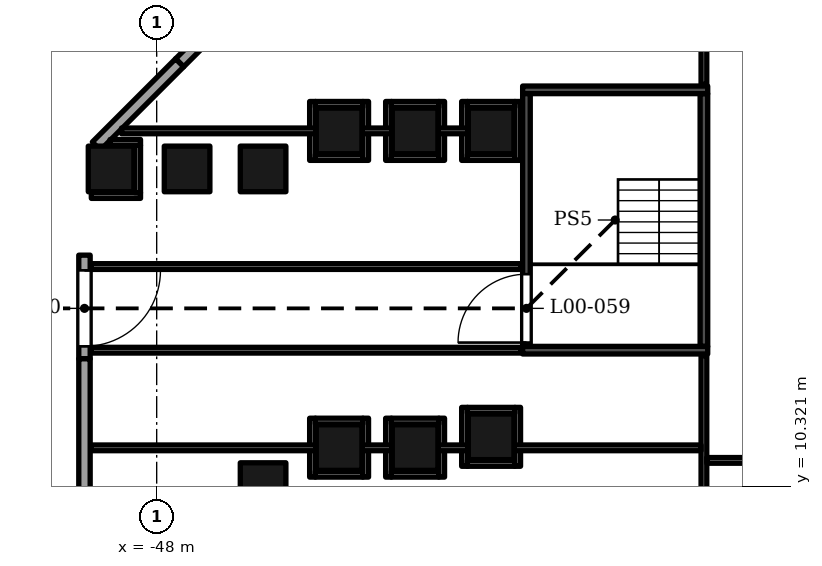
"""IFC4 building model, lengths in metres.
Left out: names, types, materials, properties, quantities, classifications, styles, units other than length and angle.
Written with IfcOpenShell. Run it as: python <this file> out.ifc"""

import sys

from ifc_helpers import new_model, si_unit, direction, frame, frame_2d, origin, origin_2d, place, context, subcontext, project, spatial, rectangle, extrude, element, fill, save


model = new_model("IFC4")
c1 = context("Model", 3, precision=1e-05, world=origin(), true_north=direction((0.0, 1.0)))
c2 = subcontext(c1, "Body", "Model", "MODEL_VIEW")
j1 = project(units=[si_unit("LENGTHUNIT", "METRE"), si_unit("PLANEANGLEUNIT", "RADIAN")], contexts=[c1])
p1 = place(None, origin())
s1 = spatial("IfcSite", under=j1, at=p1, CompositionType="ELEMENT")
p2 = place(p1, origin())
s2 = spatial("IfcBuilding", under=s1, at=p2, CompositionType="ELEMENT")
p3 = place(p2, origin())
s3 = spatial("IfcBuildingStorey", under=s2, at=p3, CompositionType="ELEMENT", Elevation=0.0)
for number, where, z_axis, x_axis in (
    (1, (-39.2, 19.669, 0.0), (0.0, 0.0, 1.0), (1.0, 0.0, 0.0)),
    (2, (-39.2, 11.62, 0.0), (0.0, 0.0, 1.0), (1.0, 0.0, 0.0)),
    (3, (-41.2, 19.669, 0.0), (0.0, 0.0, 1.0), (1.0, 0.0, 0.0)),
    (4, (-41.2, 11.337, 0.0), (0.0, 0.0, 1.0), (1.0, 0.0, 0.0)),
    (5, (-43.2, 19.669, 0.0), (0.0, 0.0, 1.0), (1.0, 0.0, 0.0)),
    (6, (-43.2, 11.337, 0.0), (0.0, 0.0, 1.0), (1.0, 0.0, 0.0)),
    (7, (-45.2, 18.669, 0.0), (0.0, 0.0, 1.0), (1.0, 0.0, 0.0)),
    (8, (-45.2, 10.337, 0.0), (0.0, 0.0, 1.0), (1.0, 0.0, 0.0)),
    (9, (-47.2, 18.669, 0.0), (0.0, 0.0, 1.0), (1.0, 0.0, 0.0)),
    (10, (-49.2, 18.669, 0.0), (0.0, 0.0, 1.0), (1.0, 0.0, 0.0)),
):
    element("IfcColumn", number, at=place(p3, frame(where, z_axis=z_axis, x_axis=x_axis)), inside=s3, PredefinedType="COLUMN", context=c2, shape_type="SweptSolid", body=[
        extrude(rectangle(XDim=1.2, YDim=1.2, at=origin_2d()), origin(), (0.0, 0.0, 1.0), 9.0),
    ])
p4 = place(p3, frame((-44.271, 24.588, 0.0), z_axis=(0.0, 0.0, 1.0), x_axis=(-0.707079166839, -0.707134394455, 0.0)))
e11 = element("IfcWall", 11, at=p4, inside=s3, PredefinedType="ELEMENTEDWALL", context=c2, shape_type="SweptSolid", body=[
    extrude(rectangle(XDim=4.421, YDim=0.3, at=frame_2d((2.21, 0.0))), origin(), (0.0, 0.0, 1.0), 7.6),
])
p5 = place(p4, frame((1.021, 0.0, 0.0)))
e12 = element("IfcOpeningElement", 12, at=p5, cuts=e11, PredefinedType="OPENING", context=c2, shape_type="SweptSolid", body=[
    extrude(rectangle(XDim=3.0, YDim=2.7, at=frame_2d((1.5, 1.35))), frame((0.0, 0.16, 0.0), z_axis=(0.0, -1.0, 0.0), x_axis=(1.0, 0.0, 0.0)), (0.0, 0.0, 1.0), 0.32),
])
p6 = place(p3, frame((-47.397, 21.462, 0.0), z_axis=(0.0, 0.0, 1.0), x_axis=(-0.707146179809, -0.707067380369, 0.0)))
e13 = element("IfcWall", 13, at=p6, inside=s3, PredefinedType="SOLIDWALL", context=c2, shape_type="SweptSolid", body=[
    extrude(rectangle(XDim=3.098, YDim=0.3, at=frame_2d((1.549, 0.0))), origin(), (0.0, 0.0, 1.0), 7.6),
])
p7 = place(p3, frame((-49.9, 16.4, 0.0), z_axis=(0.0, 0.0, 1.0), x_axis=(0.0, -1.0, 0.0)))
e14 = element("IfcWall", 14, at=p7, inside=s3, PredefinedType="ELEMENTEDWALL", context=c2, shape_type="SweptSolid", body=[
    extrude(rectangle(XDim=2.727, YDim=0.3, at=frame_2d((1.363, 0.0))), origin(), (0.0, 0.0, 1.0), 7.6),
])
p8 = place(p7, frame((0.4, 0.0, 0.0)))
e15 = element("IfcOpeningElement", 15, at=p8, cuts=e14, PredefinedType="OPENING", context=c2, shape_type="SweptSolid", body=[
    extrude(rectangle(XDim=2.0, YDim=2.4, at=frame_2d((1.0, 1.2))), frame((0.0, 0.16, 0.0), z_axis=(0.0, -1.0, 0.0), x_axis=(1.0, 0.0, 0.0)), (0.0, 0.0, 1.0), 0.32),
])
p9 = place(p3, frame((-49.9, 13.673, 0.0), z_axis=(0.0, 0.0, 1.0), x_axis=(0.0, -1.0, 0.0)))
e16 = element("IfcWall", 16, at=p9, inside=s3, PredefinedType="ELEMENTEDWALL", context=c2, shape_type="SweptSolid", body=[
    extrude(rectangle(XDim=4.102, YDim=0.3, at=frame_2d((2.051, 0.0))), origin(), (0.0, 0.0, 1.0), 7.6),
])
p10 = place(p9, frame((0.327, 0.0, 0.0)))
e17 = element("IfcOpeningElement", 17, at=p10, cuts=e16, PredefinedType="OPENING", context=c2, shape_type="SweptSolid", body=[
    extrude(rectangle(XDim=1.2, YDim=2.7, at=frame_2d((0.6, 1.35))), frame((0.0, 0.16, 0.0), z_axis=(0.0, -1.0, 0.0), x_axis=(1.0, 0.0, 0.0)), (0.0, 0.0, 1.0), 0.32),
])
p11 = place(p3, frame((-44.042, 24.745, 9.0), z_axis=(0.0, 0.0, 1.0), x_axis=(-0.7071215324, -0.707092029666, 0.0)))
e18 = element("IfcWall", 18, at=p11, inside=s3, PredefinedType="PARAPET", context=c2, shape_type="SweptSolid", body=[
    extrude(rectangle(XDim=8.275, YDim=0.3, at=frame_2d((4.138, 0.0))), origin(), (0.0, 0.0, 1.0), 1.1),
])
p12 = place(p3, frame((-49.85, 18.79, 9.0), z_axis=(0.0, 0.0, 1.0), x_axis=(0.0, -1.0, 0.0)))
e19 = element("IfcWall", 19, at=p12, inside=s3, PredefinedType="PARAPET", context=c2, shape_type="SweptSolid", body=[
    extrude(rectangle(XDim=14.698, YDim=0.3, at=frame_2d((7.349, 0.0))), origin(), (0.0, 0.0, 1.0), 1.1),
])
for number, where, z_axis, x_axis in (
    (20, (-38.37, 13.9, 0.0), (0.0, 0.0, 1.0), (1.0, 0.0, 0.0)),
    (21, (-38.37, 20.75, 0.0), (0.0, 0.0, 1.0), (1.0, 0.0, 0.0)),
):
    element("IfcWall", number, at=place(p3, frame(where, z_axis=z_axis, x_axis=x_axis)), inside=s3, PredefinedType="SOLIDWALL", context=c2, shape_type="SweptSolid", body=[
        extrude(rectangle(XDim=4.87, YDim=0.2, at=frame_2d((2.435, 0.0))), origin(), (0.0, 0.0, 1.0), 8.5),
    ])
p13 = place(p3, frame((-38.27, 14.0, 0.0), z_axis=(0.0, 0.0, 1.0), x_axis=(0.0, 1.0, 0.0)))
e22 = element("IfcWall", 22, at=p13, inside=s3, PredefinedType="SOLIDWALL", context=c2, shape_type="SweptSolid", body=[
    extrude(rectangle(XDim=6.65, YDim=0.2, at=frame_2d((3.325, 0.0))), origin(), (0.0, 0.0, 1.0), 8.5),
])
p14 = place(p13, frame((0.1, 0.0, 0.0)))
e23 = element("IfcOpeningElement", 23, at=p14, cuts=e22, PredefinedType="OPENING", context=c2, shape_type="SweptSolid", body=[
    extrude(rectangle(XDim=1.8, YDim=2.4, at=frame_2d((0.9, 1.2))), frame((0.0, 0.11, 0.0), z_axis=(0.0, -1.0, 0.0), x_axis=(1.0, 0.0, 0.0)), (0.0, 0.0, 1.0), 0.22),
])
p15 = place(p3, frame((-33.6, 14.0, 0.0), z_axis=(0.0, 0.0, 1.0), x_axis=(0.0, 1.0, 0.0)))
e24 = element("IfcWall", 24, at=p15, inside=s3, PredefinedType="SOLIDWALL", context=c2, shape_type="SweptSolid", body=[
    extrude(rectangle(XDim=6.65, YDim=0.2, at=frame_2d((3.325, 0.0))), origin(), (0.0, 0.0, 1.0), 8.5),
])
p16 = place(p15, frame((0.1, 0.0, 0.0)))
e25 = element("IfcOpeningElement", 25, at=p16, cuts=e24, PredefinedType="OPENING", context=c2, shape_type="SweptSolid", body=[
    extrude(rectangle(XDim=1.8, YDim=2.4, at=frame_2d((0.9, 1.2))), frame((0.0, 0.11, 0.0), z_axis=(0.0, -1.0, 0.0), x_axis=(1.0, 0.0, 0.0)), (0.0, 0.0, 1.0), 0.22),
])
p17 = place(p3, frame((-33.6, 4.69, 0.0), z_axis=(0.0, 0.0, 1.0), x_axis=(0.0, 1.0, 0.0)))
e26 = element("IfcWall", 26, at=p17, inside=s3, PredefinedType="PARTITIONING", context=c2, shape_type="SweptSolid", body=[
    extrude(rectangle(XDim=9.07, YDim=0.15, at=frame_2d((4.535, 0.0))), origin(), (0.0, 0.0, 1.0), 7.3),
])
p18 = place(p3, frame((-43.9, 10.56, 0.0), z_axis=(0.0, 0.0, 1.0), x_axis=(0.0, 1.0, 0.0)))
e27 = element("IfcWall", 27, at=p18, inside=s3, PredefinedType="PARTITIONING", context=c2, shape_type="SweptSolid", body=[
    extrude(rectangle(XDim=1.55, YDim=0.15, at=frame_2d((0.775, 0.0))), origin(), (0.0, 0.0, 1.0), 8.5),
])
p19 = place(p3, frame((-43.825, 10.635, 0.0), z_axis=(0.0, 0.0, 1.0), x_axis=(1.0, 0.0, 0.0)))
e28 = element("IfcWall", 28, at=p19, inside=s3, PredefinedType="PARTITIONING", context=c2, shape_type="SweptSolid", body=[
    extrude(rectangle(XDim=1.25, YDim=0.15, at=frame_2d((0.625, 0.0))), origin(), (0.0, 0.0, 1.0), 8.5),
])
for number, where, z_axis, x_axis in (
    (29, (-42.5, 10.56, 0.0), (0.0, 0.0, 1.0), (0.0, 1.0, 0.0)),
    (30, (-41.9, 10.56, 0.0), (0.0, 0.0, 1.0), (0.0, 1.0, 0.0)),
):
    element("IfcWall", number, at=place(p3, frame(where, z_axis=z_axis, x_axis=x_axis)), inside=s3, PredefinedType="PARTITIONING", context=c2, shape_type="SweptSolid", body=[
        extrude(rectangle(XDim=1.55, YDim=0.15, at=frame_2d((0.775, 0.0))), origin(), (0.0, 0.0, 1.0), 8.5),
    ])
p20 = place(p3, frame((-41.825, 10.635, 0.0), z_axis=(0.0, 0.0, 1.0), x_axis=(1.0, 0.0, 0.0)))
e31 = element("IfcWall", 31, at=p20, inside=s3, PredefinedType="PARTITIONING", context=c2, shape_type="SweptSolid", body=[
    extrude(rectangle(XDim=1.25, YDim=0.15, at=frame_2d((0.625, 0.0))), origin(), (0.0, 0.0, 1.0), 8.5),
])
for number, where, z_axis, x_axis in (
    (32, (-40.5, 10.56, 0.0), (0.0, 0.0, 1.0), (0.0, 1.0, 0.0)),
    (33, (-39.9, 10.845, 0.0), (0.0, 0.0, 1.0), (0.0, 1.0, 0.0)),
):
    element("IfcWall", number, at=place(p3, frame(where, z_axis=z_axis, x_axis=x_axis)), inside=s3, PredefinedType="PARTITIONING", context=c2, shape_type="SweptSolid", body=[
        extrude(rectangle(XDim=1.55, YDim=0.15, at=frame_2d((0.775, 0.0))), origin(), (0.0, 0.0, 1.0), 8.5),
    ])
p21 = place(p3, frame((-39.825, 10.92, 0.0), z_axis=(0.0, 0.0, 1.0), x_axis=(1.0, 0.0, 0.0)))
e34 = element("IfcWall", 34, at=p21, inside=s3, PredefinedType="PARTITIONING", context=c2, shape_type="SweptSolid", body=[
    extrude(rectangle(XDim=1.25, YDim=0.15, at=frame_2d((0.625, 0.0))), origin(), (0.0, 0.0, 1.0), 8.5),
])
p22 = place(p3, frame((-38.5, 10.845, 0.0), z_axis=(0.0, 0.0, 1.0), x_axis=(0.0, 1.0, 0.0)))
e35 = element("IfcWall", 35, at=p22, inside=s3, PredefinedType="PARTITIONING", context=c2, shape_type="SweptSolid", body=[
    extrude(rectangle(XDim=1.55, YDim=0.15, at=frame_2d((0.775, 0.0))), origin(), (0.0, 0.0, 1.0), 8.5),
])
p23 = place(p3, frame((-33.525, 11.0, 0.0), z_axis=(0.0, 0.0, 1.0), x_axis=(1.0, 0.0, 0.0)))
e36 = element("IfcWall", 36, at=p23, inside=s3, PredefinedType="PARTITIONING", context=c2, shape_type="SweptSolid", body=[
    extrude(rectangle(XDim=3.85, YDim=0.15, at=frame_2d((1.925, 0.0))), origin(), (0.0, 0.0, 1.0), 7.3),
])
p24 = place(p23, frame((1.425, 0.0, 0.0)))
e37 = element("IfcOpeningElement", 37, at=p24, cuts=e36, PredefinedType="OPENING", context=c2, shape_type="SweptSolid", body=[
    extrude(rectangle(XDim=0.9, YDim=2.1, at=frame_2d((0.45, 1.05))), frame((0.0, 0.085, 0.0), z_axis=(0.0, -1.0, 0.0), x_axis=(1.0, 0.0, 0.0)), (0.0, 0.0, 1.0), 0.17),
])
p25 = place(p3, frame((-49.72, 11.33, 0.0), z_axis=(0.0, 0.0, 1.0), x_axis=(1.0, 0.0, 0.0)))
e38 = element("IfcWall", 38, at=p25, inside=s3, PredefinedType="PARTITIONING", context=c2, shape_type="SweptSolid", body=[
    extrude(rectangle(XDim=5.92, YDim=0.15, at=frame_2d((2.96, 0.0))), origin(), (0.0, 0.0, 1.0), 7.6),
])
for number, where, z_axis, x_axis in (
    (39, (-42.6, 11.33, 0.0), (0.0, 0.0, 1.0), (1.0, 0.0, 0.0)),
    (40, (-40.6, 11.33, 0.0), (0.0, 0.0, 1.0), (1.0, 0.0, 0.0)),
):
    element("IfcWall", number, at=place(p3, frame(where, z_axis=z_axis, x_axis=x_axis)), inside=s3, PredefinedType="PARTITIONING", context=c2, shape_type="SweptSolid", body=[
        extrude(rectangle(XDim=0.8, YDim=0.15, at=frame_2d((0.4, 0.0))), origin(), (0.0, 0.0, 1.0), 8.5),
    ])
p26 = place(p3, frame((-38.6, 11.33, 0.0), z_axis=(0.0, 0.0, 1.0), x_axis=(1.0, 0.0, 0.0)))
e41 = element("IfcWall", 41, at=p26, inside=s3, PredefinedType="PARTITIONING", context=c2, shape_type="SweptSolid", body=[
    extrude(rectangle(XDim=4.925, YDim=0.15, at=frame_2d((2.462, 0.0))), origin(), (0.0, 0.0, 1.0), 8.5),
])
for number, where, z_axis, x_axis in (
    (42, (-43.825, 12.035, 0.0), (0.0, 0.0, 1.0), (1.0, 0.0, 0.0)),
    (43, (-41.825, 12.035, 0.0), (0.0, 0.0, 1.0), (1.0, 0.0, 0.0)),
    (44, (-39.825, 12.32, 0.0), (0.0, 0.0, 1.0), (1.0, 0.0, 0.0)),
):
    element("IfcWall", number, at=place(p3, frame(where, z_axis=z_axis, x_axis=x_axis)), inside=s3, PredefinedType="PARTITIONING", context=c2, shape_type="SweptSolid", body=[
        extrude(rectangle(XDim=1.25, YDim=0.15, at=frame_2d((0.625, 0.0))), origin(), (0.0, 0.0, 1.0), 8.5),
    ])
p27 = place(p3, frame((-49.72, 13.899, 0.0), z_axis=(0.0, 0.0, 1.0), x_axis=(1.0, 0.0, 0.0)))
e45 = element("IfcWall", 45, at=p27, inside=s3, PredefinedType="PARTITIONING", context=c2, shape_type="SweptSolid", body=[
    extrude(rectangle(XDim=11.31, YDim=0.151, at=frame_2d((5.655, 0.0))), origin(), (0.0, 0.0, 1.0), 7.6),
])
p28 = place(p27, frame((5.155, 0.0, 0.0)))
e46 = element("IfcOpeningElement", 46, at=p28, cuts=e45, PredefinedType="OPENING", context=c2, shape_type="SweptSolid", body=[
    extrude(rectangle(XDim=1.2, YDim=2.1, at=frame_2d((0.6, 1.05))), frame((0.0, 0.085, 0.0), z_axis=(0.0, -1.0, 0.0), x_axis=(1.0, 0.0, 0.0)), (0.0, 0.0, 1.0), 0.171),
])
p29 = place(p3, frame((-49.72, 16.101, 0.0), z_axis=(0.0, 0.0, 1.0), x_axis=(1.0, 0.0, 0.0)))
e47 = element("IfcWall", 47, at=p29, inside=s3, PredefinedType="PARTITIONING", context=c2, shape_type="SweptSolid", body=[
    extrude(rectangle(XDim=11.31, YDim=0.151, at=frame_2d((5.655, 0.0))), origin(), (0.0, 0.0, 1.0), 7.6),
])
p30 = place(p29, frame((5.07, 0.0, 0.0)))
e48 = element("IfcOpeningElement", 48, at=p30, cuts=e47, PredefinedType="OPENING", context=c2, shape_type="SweptSolid", body=[
    extrude(rectangle(XDim=1.2, YDim=2.1, at=frame_2d((0.6, 1.05))), frame((0.0, 0.085, 0.0), z_axis=(0.0, -1.0, 0.0), x_axis=(1.0, 0.0, 0.0)), (0.0, 0.0, 1.0), 0.171),
])
p31 = place(p3, frame((-49.72, 17.969, 0.0), z_axis=(0.0, 0.0, 1.0), x_axis=(1.0, 0.0, 0.0)))
e49 = element("IfcWall", 49, at=p31, inside=s3, PredefinedType="PARTITIONING", context=c2, shape_type="SweptSolid", body=[
    extrude(rectangle(XDim=1.295, YDim=0.15, at=frame_2d((0.647, 0.0))), origin(), (0.0, 0.0, 1.0), 8.5),
])
p32 = place(p3, frame((-48.5, 18.044, 0.0), z_axis=(0.0, 0.0, 1.0), x_axis=(0.0, 1.0, 0.0)))
e50 = element("IfcWall", 50, at=p32, inside=s3, PredefinedType="PARTITIONING", context=c2, shape_type="SweptSolid", body=[
    extrude(rectangle(XDim=1.25, YDim=0.15, at=frame_2d((0.625, 0.0))), origin(), (0.0, 0.0, 1.0), 8.5),
])
p33 = place(p3, frame((-43.9, 18.894, 0.0), z_axis=(0.0, 0.0, 1.0), x_axis=(0.0, 1.0, 0.0)))
e51 = element("IfcWall", 51, at=p33, inside=s3, PredefinedType="PARTITIONING", context=c2, shape_type="SweptSolid", body=[
    extrude(rectangle(XDim=1.55, YDim=0.15, at=frame_2d((0.775, 0.0))), origin(), (0.0, 0.0, 1.0), 8.5),
])
p34 = place(p3, frame((-43.825, 18.969, 0.0), z_axis=(0.0, 0.0, 1.0), x_axis=(1.0, 0.0, 0.0)))
e52 = element("IfcWall", 52, at=p34, inside=s3, PredefinedType="PARTITIONING", context=c2, shape_type="SweptSolid", body=[
    extrude(rectangle(XDim=1.25, YDim=0.15, at=frame_2d((0.625, 0.0))), origin(), (0.0, 0.0, 1.0), 8.5),
])
for number, where, z_axis, x_axis in (
    (53, (-42.5, 18.894, 0.0), (0.0, 0.0, 1.0), (0.0, 1.0, 0.0)),
    (54, (-41.9, 18.894, 0.0), (0.0, 0.0, 1.0), (0.0, 1.0, 0.0)),
):
    element("IfcWall", number, at=place(p3, frame(where, z_axis=z_axis, x_axis=x_axis)), inside=s3, PredefinedType="PARTITIONING", context=c2, shape_type="SweptSolid", body=[
        extrude(rectangle(XDim=1.55, YDim=0.15, at=frame_2d((0.775, 0.0))), origin(), (0.0, 0.0, 1.0), 8.5),
    ])
p35 = place(p3, frame((-41.825, 18.969, 0.0), z_axis=(0.0, 0.0, 1.0), x_axis=(1.0, 0.0, 0.0)))
e55 = element("IfcWall", 55, at=p35, inside=s3, PredefinedType="PARTITIONING", context=c2, shape_type="SweptSolid", body=[
    extrude(rectangle(XDim=1.25, YDim=0.15, at=frame_2d((0.625, 0.0))), origin(), (0.0, 0.0, 1.0), 8.5),
])
for number, where, z_axis, x_axis in (
    (56, (-40.5, 18.894, 0.0), (0.0, 0.0, 1.0), (0.0, 1.0, 0.0)),
    (57, (-39.9, 18.894, 0.0), (0.0, 0.0, 1.0), (0.0, 1.0, 0.0)),
):
    element("IfcWall", number, at=place(p3, frame(where, z_axis=z_axis, x_axis=x_axis)), inside=s3, PredefinedType="PARTITIONING", context=c2, shape_type="SweptSolid", body=[
        extrude(rectangle(XDim=1.55, YDim=0.15, at=frame_2d((0.775, 0.0))), origin(), (0.0, 0.0, 1.0), 8.5),
    ])
p36 = place(p3, frame((-39.825, 18.969, 0.0), z_axis=(0.0, 0.0, 1.0), x_axis=(1.0, 0.0, 0.0)))
e58 = element("IfcWall", 58, at=p36, inside=s3, PredefinedType="PARTITIONING", context=c2, shape_type="SweptSolid", body=[
    extrude(rectangle(XDim=1.25, YDim=0.15, at=frame_2d((0.625, 0.0))), origin(), (0.0, 0.0, 1.0), 8.5),
])
p37 = place(p3, frame((-38.5, 18.894, 0.0), z_axis=(0.0, 0.0, 1.0), x_axis=(0.0, 1.0, 0.0)))
e59 = element("IfcWall", 59, at=p37, inside=s3, PredefinedType="PARTITIONING", context=c2, shape_type="SweptSolid", body=[
    extrude(rectangle(XDim=1.55, YDim=0.15, at=frame_2d((0.775, 0.0))), origin(), (0.0, 0.0, 1.0), 8.5),
])
p38 = place(p3, frame((-49.227, 19.369, 0.0), z_axis=(0.0, 0.0, 1.0), x_axis=(1.0, 0.0, 0.0)))
e60 = element("IfcWall", 60, at=p38, inside=s3, PredefinedType="PARTITIONING", context=c2, shape_type="SweptSolid", body=[
    extrude(rectangle(XDim=0.802, YDim=0.15, at=frame_2d((0.401, 0.0))), origin(), (0.0, 0.0, 1.0), 8.5),
])
p39 = place(p3, frame((-48.926, 19.67, 0.0), z_axis=(0.0, 0.0, 1.0), x_axis=(1.0, 0.0, 0.0)))
e61 = element("IfcWall", 61, at=p39, inside=s3, PredefinedType="PARTITIONING", context=c2, shape_type="SweptSolid", body=[
    extrude(rectangle(XDim=5.126, YDim=0.15, at=frame_2d((2.563, 0.0))), origin(), (0.0, 0.0, 1.0), 7.6),
])
for number, where, z_axis, x_axis in (
    (62, (-42.6, 19.67, 0.0), (0.0, 0.0, 1.0), (1.0, 0.0, 0.0)),
    (63, (-40.6, 19.67, 0.0), (0.0, 0.0, 1.0), (1.0, 0.0, 0.0)),
):
    element("IfcWall", number, at=place(p3, frame(where, z_axis=z_axis, x_axis=x_axis)), inside=s3, PredefinedType="PARTITIONING", context=c2, shape_type="SweptSolid", body=[
        extrude(rectangle(XDim=0.8, YDim=0.15, at=frame_2d((0.4, 0.0))), origin(), (0.0, 0.0, 1.0), 8.5),
    ])
for number, where, z_axis, x_axis in (
    (64, (-43.825, 20.369, 0.0), (0.0, 0.0, 1.0), (1.0, 0.0, 0.0)),
    (65, (-41.825, 20.369, 0.0), (0.0, 0.0, 1.0), (1.0, 0.0, 0.0)),
    (66, (-39.825, 20.369, 0.0), (0.0, 0.0, 1.0), (1.0, 0.0, 0.0)),
):
    element("IfcWall", number, at=place(p3, frame(where, z_axis=z_axis, x_axis=x_axis)), inside=s3, PredefinedType="PARTITIONING", context=c2, shape_type="SweptSolid", body=[
        extrude(rectangle(XDim=1.25, YDim=0.15, at=frame_2d((0.625, 0.0))), origin(), (0.0, 0.0, 1.0), 8.5),
    ])
p40 = place(p3, frame((-33.6, 20.89, 0.0), z_axis=(0.0, 0.0, 1.0), x_axis=(0.0, 1.0, 0.0)))
e67 = element("IfcWall", 67, at=p40, inside=s3, PredefinedType="PARTITIONING", context=c2, shape_type="SweptSolid", body=[
    extrude(rectangle(XDim=3.88, YDim=0.15, at=frame_2d((1.94, 0.0))), origin(), (0.0, 0.0, 1.0), 7.6),
])
p41 = place(p40, frame((0.661, 0.0, 0.0)))
e68 = element("IfcOpeningElement", 68, at=p41, cuts=e67, PredefinedType="OPENING", context=c2, shape_type="SweptSolid", body=[
    extrude(rectangle(XDim=1.2, YDim=2.1, at=frame_2d((0.6, 1.05))), frame((0.0, 0.085, 0.0), z_axis=(0.0, -1.0, 0.0), x_axis=(1.0, 0.0, 0.0)), (0.0, 0.0, 1.0), 0.17),
])
p42 = place(p5, origin())
e69 = element("IfcDoor", 69, at=p42, inside=s3, OperationType="DOUBLE_DOOR_SINGLE_SWING", PredefinedType="DOOR", context=c2, shape_type="SweptSolid", body=[
    extrude(rectangle(XDim=3.0, YDim=2.7, at=frame_2d((1.5, 1.35))), frame((0.0, 0.025, 0.0), z_axis=(0.0, -1.0, 0.0), x_axis=(1.0, 0.0, 0.0)), (0.0, 0.0, 1.0), 0.05),
])
fill(e12, e69)
p43 = place(p8, origin())
e70 = element("IfcDoor", 70, at=p43, inside=s3, OperationType="DOUBLE_DOOR_SINGLE_SWING", PredefinedType="DOOR", context=c2, shape_type="SweptSolid", body=[
    extrude(rectangle(XDim=2.0, YDim=2.4, at=frame_2d((1.0, 1.2))), frame((0.0, 0.025, 0.0), z_axis=(0.0, -1.0, 0.0), x_axis=(1.0, 0.0, 0.0)), (0.0, 0.0, 1.0), 0.05),
])
fill(e15, e70)
p44 = place(p10, origin())
e71 = element("IfcDoor", 71, at=p44, inside=s3, OperationType="DOUBLE_DOOR_SINGLE_SWING", PredefinedType="DOOR", context=c2, shape_type="SweptSolid", body=[
    extrude(rectangle(XDim=1.2, YDim=2.7, at=frame_2d((0.6, 1.35))), frame((0.0, 0.025, 0.0), z_axis=(0.0, -1.0, 0.0), x_axis=(1.0, 0.0, 0.0)), (0.0, 0.0, 1.0), 0.05),
])
fill(e17, e71)
p45 = place(p16, origin())
e72 = element("IfcDoor", 72, at=p45, inside=s3, OperationType="DOUBLE_DOOR_SINGLE_SWING", PredefinedType="DOOR", context=c2, shape_type="SweptSolid", body=[
    extrude(rectangle(XDim=1.8, YDim=2.4, at=frame_2d((0.9, 1.2))), frame((0.0, 0.025, 0.0), z_axis=(0.0, -1.0, 0.0), x_axis=(1.0, 0.0, 0.0)), (0.0, 0.0, 1.0), 0.05),
])
fill(e25, e72)
p46 = place(p14, origin())
e73 = element("IfcDoor", 73, at=p46, inside=s3, OperationType="DOUBLE_DOOR_SINGLE_SWING", PredefinedType="DOOR", context=c2, shape_type="SweptSolid", body=[
    extrude(rectangle(XDim=1.8, YDim=2.4, at=frame_2d((0.9, 1.2))), frame((0.0, 0.025, 0.0), z_axis=(0.0, -1.0, 0.0), x_axis=(1.0, 0.0, 0.0)), (0.0, 0.0, 1.0), 0.05),
])
fill(e23, e73)
p47 = place(p28, origin())
e74 = element("IfcDoor", 74, at=p47, inside=s3, OperationType="SINGLE_SWING_RIGHT", PredefinedType="DOOR", context=c2, shape_type="SweptSolid", body=[
    extrude(rectangle(XDim=1.2, YDim=2.1, at=frame_2d((0.6, 1.05))), frame((0.0, 0.025, 0.0), z_axis=(0.0, -1.0, 0.0), x_axis=(1.0, 0.0, 0.0)), (0.0, 0.0, 1.0), 0.05),
])
fill(e46, e74)
p48 = place(p30, origin())
e75 = element("IfcDoor", 75, at=p48, inside=s3, OperationType="SINGLE_SWING_LEFT", PredefinedType="DOOR", context=c2, shape_type="SweptSolid", body=[
    extrude(rectangle(XDim=1.2, YDim=2.1, at=frame_2d((0.6, 1.05))), frame((0.0, 0.025, 0.0), z_axis=(0.0, -1.0, 0.0), x_axis=(1.0, 0.0, 0.0)), (0.0, 0.0, 1.0), 0.05),
])
fill(e48, e75)
p49 = place(p41, origin())
e76 = element("IfcDoor", 76, at=p49, inside=s3, OperationType="SINGLE_SWING_RIGHT", PredefinedType="DOOR", context=c2, shape_type="SweptSolid", body=[
    extrude(rectangle(XDim=1.2, YDim=2.1, at=frame_2d((0.6, 1.05))), frame((0.0, 0.025, 0.0), z_axis=(0.0, -1.0, 0.0), x_axis=(1.0, 0.0, 0.0)), (0.0, 0.0, 1.0), 0.05),
])
fill(e68, e76)
save(model, sys.argv[1])
